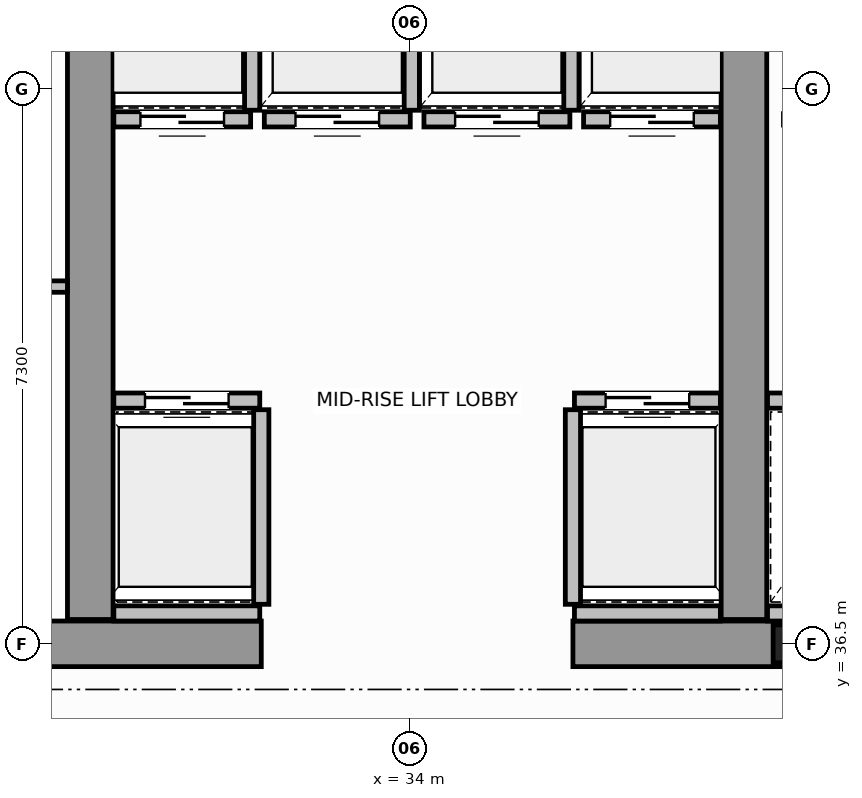
"""IFC4 building model, lengths in metres.
Left out: names, types, materials, properties, quantities, classifications, styles, units other than length and angle.
Written with IfcOpenShell. Run it as: python <this file> out.ifc"""

import sys

from ifc_helpers import new_model, si_unit, direction, frame, frame_2d, origin, origin_2d, place, context, subcontext, project, spatial, rectangle, i_section, extrude, source, transform, mapped, element, fill, save


model = new_model("IFC4")
c1 = context("Model", 3, precision=1e-05, world=origin(), true_north=direction((0.0, 1.0)))
c2 = subcontext(c1, "Body", "Model", "MODEL_VIEW")
j1 = project(units=[si_unit("LENGTHUNIT", "METRE"), si_unit("PLANEANGLEUNIT", "RADIAN")], contexts=[c1])
p1 = place(None, origin())
s1 = spatial("IfcSite", under=j1, at=p1, CompositionType="ELEMENT")
p2 = place(p1, origin())
s2 = spatial("IfcBuilding", under=s1, at=p2, CompositionType="ELEMENT")
p3 = place(p2, frame((0.0, 0.0, 191.8)))
s3 = spatial("IfcBuildingStorey", under=s2, at=p3, CompositionType="ELEMENT", Elevation=191.8)
m1 = source(origin(), c2, "Body", "SweptSolid", [
    extrude(i_section(OverallWidth=0.432, OverallDepth=0.498, WebThickness=0.055, FlangeThickness=0.068, FilletRadius=0.015, at=origin_2d()), origin(), (0.0, 0.0, 1.0), 3.8),
])
p4 = place(p3, frame((39.0, 36.5, 0.0), z_axis=(0.0, 0.0, 1.0), x_axis=(1.0, 0.0, 0.0)))
e1 = element("IfcColumn", 1, at=p4, inside=s3, PredefinedType="COLUMN", context=c2, shape_type="MappedRepresentation", body=[
    mapped(m1, transform((0.0, 0.0, 0.0), scale=1.0)),
])
for number, where, z_axis, x_axis in (
    (2, (27.55, 36.5, 0.0), (0.0, 0.0, 1.0), (1.0, 0.0, 0.0)),
    (3, (36.15, 36.5, 0.0), (0.0, 0.0, 1.0), (1.0, 0.0, 0.0)),
):
    element("IfcWall", number, at=place(p3, frame(where, z_axis=z_axis, x_axis=x_axis)), inside=s3, PredefinedType="SHEAR", context=c2, shape_type="SweptSolid", body=[
        extrude(rectangle(XDim=4.5, YDim=0.6, at=frame_2d((2.25, 0.0))), origin(), (0.0, 0.0, 1.0), 3.8),
    ])
for number, where, z_axis, x_axis in (
    (4, (29.8, 36.82, 0.0), (0.0, 0.0, 1.0), (0.0, 1.0, 0.0)),
    (5, (38.4, 36.82, 0.0), (0.0, 0.0, 1.0), (0.0, 1.0, 0.0)),
):
    element("IfcWall", number, at=place(p3, frame(where, z_axis=z_axis, x_axis=x_axis)), inside=s3, PredefinedType="SHEAR", context=c2, shape_type="SweptSolid", body=[
        extrude(rectangle(XDim=9.38, YDim=0.6, at=frame_2d((4.69, 0.0))), origin(), (0.0, 0.0, 1.0), 3.8),
    ])
p5 = place(p3, frame((30.11, 39.7, 0.0), z_axis=(0.0, 0.0, 1.0), x_axis=(1.0, 0.0, 0.0)))
e6 = element("IfcWall", 6, at=p5, inside=s3, PredefinedType="SOLIDWALL", context=c2, shape_type="SweptSolid", body=[
    extrude(rectangle(XDim=1.92, YDim=0.2, at=frame_2d((0.96, 0.0))), origin(), (0.0, 0.0, 1.0), 3.58),
])
p6 = place(p5, frame((0.41, 0.0, 0.0)))
e7 = element("IfcOpeningElement", 7, at=p6, cuts=e6, PredefinedType="OPENING", context=c2, shape_type="SweptSolid", body=[
    extrude(rectangle(XDim=1.1, YDim=2.15, at=frame_2d((0.55, 1.075))), frame((0.0, 0.11, 0.0), z_axis=(0.0, -1.0, 0.0), x_axis=(1.0, 0.0, 0.0)), (0.0, 0.0, 1.0), 0.22),
])
p7 = place(p3, frame((30.11, 36.9, 0.0), z_axis=(0.0, 0.0, 1.0), x_axis=(1.0, 0.0, 0.0)))
e8 = element("IfcWall", 8, at=p7, inside=s3, PredefinedType="SOLIDWALL", context=c2, shape_type="SweptSolid", body=[
    extrude(rectangle(XDim=1.92, YDim=0.2, at=frame_2d((0.96, 0.0))), origin(), (0.0, 0.0, 1.0), 3.58),
])
p8 = place(p3, frame((32.05, 37.02, 0.0), z_axis=(0.0, 0.0, 1.0), x_axis=(0.0, 1.0, 0.0)))
e9 = element("IfcWall", 9, at=p8, inside=s3, PredefinedType="SOLIDWALL", context=c2, shape_type="SweptSolid", body=[
    extrude(rectangle(XDim=2.56, YDim=0.2, at=frame_2d((1.28, 0.0))), origin(), (0.0, 0.0, 1.0), 3.58),
])
p9 = place(p3, frame((36.17, 39.7, 0.0), z_axis=(0.0, 0.0, 1.0), x_axis=(1.0, 0.0, 0.0)))
e10 = element("IfcWall", 10, at=p9, inside=s3, PredefinedType="SOLIDWALL", context=c2, shape_type="SweptSolid", body=[
    extrude(rectangle(XDim=1.92, YDim=0.2, at=frame_2d((0.96, 0.0))), origin(), (0.0, 0.0, 1.0), 3.58),
])
p10 = place(p9, frame((0.41, 0.0, 0.0)))
e11 = element("IfcOpeningElement", 11, at=p10, cuts=e10, PredefinedType="OPENING", context=c2, shape_type="SweptSolid", body=[
    extrude(rectangle(XDim=1.1, YDim=2.15, at=frame_2d((0.55, 1.075))), frame((0.0, 0.11, 0.0), z_axis=(0.0, -1.0, 0.0), x_axis=(1.0, 0.0, 0.0)), (0.0, 0.0, 1.0), 0.22),
])
p11 = place(p3, frame((36.17, 36.9, 0.0), z_axis=(0.0, 0.0, 1.0), x_axis=(1.0, 0.0, 0.0)))
e12 = element("IfcWall", 12, at=p11, inside=s3, PredefinedType="SOLIDWALL", context=c2, shape_type="SweptSolid", body=[
    extrude(rectangle(XDim=1.92, YDim=0.2, at=frame_2d((0.96, 0.0))), origin(), (0.0, 0.0, 1.0), 3.58),
])
p12 = place(p3, frame((36.15, 37.02, 0.0), z_axis=(0.0, 0.0, 1.0), x_axis=(0.0, 1.0, 0.0)))
e13 = element("IfcWall", 13, at=p12, inside=s3, PredefinedType="SOLIDWALL", context=c2, shape_type="SweptSolid", body=[
    extrude(rectangle(XDim=2.56, YDim=0.2, at=frame_2d((1.28, 0.0))), origin(), (0.0, 0.0, 1.0), 3.58),
])
p13 = place(p3, frame((30.11, 43.4, 0.0), z_axis=(0.0, 0.0, 1.0), x_axis=(1.0, 0.0, 0.0)))
e14 = element("IfcWall", 14, at=p13, inside=s3, PredefinedType="SOLIDWALL", context=c2, shape_type="SweptSolid", body=[
    extrude(rectangle(XDim=1.8, YDim=0.2, at=frame_2d((0.9, 0.0))), origin(), (0.0, 0.0, 1.0), 3.58),
])
p14 = place(p13, frame((0.35, 0.0, 0.0)))
e15 = element("IfcOpeningElement", 15, at=p14, cuts=e14, PredefinedType="OPENING", context=c2, shape_type="SweptSolid", body=[
    extrude(rectangle(XDim=1.1, YDim=2.15, at=frame_2d((0.55, 1.075))), frame((0.0, 0.11, 0.0), z_axis=(0.0, -1.0, 0.0), x_axis=(1.0, 0.0, 0.0)), (0.0, 0.0, 1.0), 0.22),
])
p15 = place(p3, frame((31.93, 43.52, 0.0), z_axis=(0.0, 0.0, 1.0), x_axis=(0.0, 1.0, 0.0)))
e16 = element("IfcWall", 16, at=p15, inside=s3, PredefinedType="SOLIDWALL", context=c2, shape_type="SweptSolid", body=[
    extrude(rectangle(XDim=2.56, YDim=0.2, at=frame_2d((1.28, 0.0))), origin(), (0.0, 0.0, 1.0), 3.58),
])
p16 = place(p3, frame((32.09, 43.4, 0.0), z_axis=(0.0, 0.0, 1.0), x_axis=(1.0, 0.0, 0.0)))
e17 = element("IfcWall", 17, at=p16, inside=s3, PredefinedType="SOLIDWALL", context=c2, shape_type="SweptSolid", body=[
    extrude(rectangle(XDim=1.92, YDim=0.2, at=frame_2d((0.96, 0.0))), origin(), (0.0, 0.0, 1.0), 3.58),
])
p17 = place(p16, frame((0.41, 0.0, 0.0)))
e18 = element("IfcOpeningElement", 18, at=p17, cuts=e17, PredefinedType="OPENING", context=c2, shape_type="SweptSolid", body=[
    extrude(rectangle(XDim=1.1, YDim=2.15, at=frame_2d((0.55, 1.075))), frame((0.0, 0.11, 0.0), z_axis=(0.0, -1.0, 0.0), x_axis=(1.0, 0.0, 0.0)), (0.0, 0.0, 1.0), 0.22),
])
p18 = place(p3, frame((34.03, 43.52, 0.0), z_axis=(0.0, 0.0, 1.0), x_axis=(0.0, 1.0, 0.0)))
e19 = element("IfcWall", 19, at=p18, inside=s3, PredefinedType="SOLIDWALL", context=c2, shape_type="SweptSolid", body=[
    extrude(rectangle(XDim=2.56, YDim=0.2, at=frame_2d((1.28, 0.0))), origin(), (0.0, 0.0, 1.0), 3.58),
])
p19 = place(p3, frame((34.19, 43.4, 0.0), z_axis=(0.0, 0.0, 1.0), x_axis=(1.0, 0.0, 0.0)))
e20 = element("IfcWall", 20, at=p19, inside=s3, PredefinedType="SOLIDWALL", context=c2, shape_type="SweptSolid", body=[
    extrude(rectangle(XDim=1.92, YDim=0.2, at=frame_2d((0.96, 0.0))), origin(), (0.0, 0.0, 1.0), 3.58),
])
p20 = place(p19, frame((0.41, 0.0, 0.0)))
e21 = element("IfcOpeningElement", 21, at=p20, cuts=e20, PredefinedType="OPENING", context=c2, shape_type="SweptSolid", body=[
    extrude(rectangle(XDim=1.1, YDim=2.15, at=frame_2d((0.55, 1.075))), frame((0.0, 0.11, 0.0), z_axis=(0.0, -1.0, 0.0), x_axis=(1.0, 0.0, 0.0)), (0.0, 0.0, 1.0), 0.22),
])
p21 = place(p3, frame((36.13, 43.52, 0.0), z_axis=(0.0, 0.0, 1.0), x_axis=(0.0, 1.0, 0.0)))
e22 = element("IfcWall", 22, at=p21, inside=s3, PredefinedType="SOLIDWALL", context=c2, shape_type="SweptSolid", body=[
    extrude(rectangle(XDim=2.56, YDim=0.2, at=frame_2d((1.28, 0.0))), origin(), (0.0, 0.0, 1.0), 3.58),
])
p22 = place(p3, frame((36.29, 43.4, 0.0), z_axis=(0.0, 0.0, 1.0), x_axis=(1.0, 0.0, 0.0)))
e23 = element("IfcWall", 23, at=p22, inside=s3, PredefinedType="SOLIDWALL", context=c2, shape_type="SweptSolid", body=[
    extrude(rectangle(XDim=1.8, YDim=0.2, at=frame_2d((0.9, 0.0))), origin(), (0.0, 0.0, 1.0), 3.58),
])
p23 = place(p22, frame((0.35, 0.0, 0.0)))
e24 = element("IfcOpeningElement", 24, at=p23, cuts=e23, PredefinedType="OPENING", context=c2, shape_type="SweptSolid", body=[
    extrude(rectangle(XDim=1.1, YDim=2.15, at=frame_2d((0.55, 1.075))), frame((0.0, 0.11, 0.0), z_axis=(0.0, -1.0, 0.0), x_axis=(1.0, 0.0, 0.0)), (0.0, 0.0, 1.0), 0.22),
])
for number, where, z_axis, x_axis in (
    (25, (38.71, 39.7, 0.0), (0.0, 0.0, 1.0), (1.0, 0.0, 0.0)),
    (26, (38.71, 36.9, 0.0), (0.0, 0.0, 1.0), (1.0, 0.0, 0.0)),
):
    element("IfcWall", number, at=place(p3, frame(where, z_axis=z_axis, x_axis=x_axis)), inside=s3, PredefinedType="SOLIDWALL", context=c2, shape_type="SweptSolid", body=[
        extrude(rectangle(XDim=1.92, YDim=0.2, at=frame_2d((0.96, 0.0))), origin(), (0.0, 0.0, 1.0), 3.58),
    ])
p24 = place(p3, frame((21.5, 41.2, 0.0), z_axis=(0.0, 0.0, 1.0), x_axis=(1.0, 0.0, 0.0)))
e27 = element("IfcWall", 27, at=p24, inside=s3, PredefinedType="PARTITIONING", context=c2, shape_type="SweptSolid", body=[
    extrude(rectangle(XDim=8.0, YDim=0.15, at=frame_2d((4.0, 0.0))), origin(), (0.0, 0.0, 1.0), 3.58),
])
p25 = place(p24, frame((3.4, 0.0, 0.0)))
e28 = element("IfcOpeningElement", 28, at=p25, cuts=e27, PredefinedType="OPENING", context=c2, shape_type="SweptSolid", body=[
    extrude(rectangle(XDim=0.9, YDim=2.1, at=frame_2d((0.45, 1.05))), frame((0.0, 0.085, 0.0), z_axis=(0.0, -1.0, 0.0), x_axis=(1.0, 0.0, 0.0)), (0.0, 0.0, 1.0), 0.17),
])
m2 = source(origin(), c2, "Body", "SweptSolid", [
    extrude(rectangle(XDim=1.1, YDim=2.15, at=frame_2d((0.55, 1.075))), frame((0.0, 0.025, 0.0), z_axis=(0.0, -1.0, 0.0), x_axis=(1.0, 0.0, 0.0)), (0.0, 0.0, 1.0), 0.05),
])
p26 = place(p6, origin())
e29 = element("IfcDoor", 29, at=p26, inside=s3, OperationType="DOUBLE_DOOR_SLIDING", PredefinedType="DOOR", context=c2, shape_type="MappedRepresentation", body=[
    mapped(m2, transform((0.0, 0.0, 0.0), scale=1.0)),
])
fill(e7, e29)
p27 = place(p10, origin())
e30 = element("IfcDoor", 30, at=p27, inside=s3, OperationType="DOUBLE_DOOR_SLIDING", PredefinedType="DOOR", context=c2, shape_type="MappedRepresentation", body=[
    mapped(m2, transform((0.0, 0.0, 0.0), scale=1.0)),
])
fill(e11, e30)
p28 = place(p14, origin())
e31 = element("IfcDoor", 31, at=p28, inside=s3, OperationType="DOUBLE_DOOR_SLIDING", PredefinedType="DOOR", context=c2, shape_type="MappedRepresentation", body=[
    mapped(m2, transform((0.0, 0.0, 0.0), scale=1.0)),
])
fill(e15, e31)
p29 = place(p17, origin())
e32 = element("IfcDoor", 32, at=p29, inside=s3, OperationType="DOUBLE_DOOR_SLIDING", PredefinedType="DOOR", context=c2, shape_type="MappedRepresentation", body=[
    mapped(m2, transform((0.0, 0.0, 0.0), scale=1.0)),
])
fill(e18, e32)
p30 = place(p20, origin())
e33 = element("IfcDoor", 33, at=p30, inside=s3, OperationType="DOUBLE_DOOR_SLIDING", PredefinedType="DOOR", context=c2, shape_type="MappedRepresentation", body=[
    mapped(m2, transform((0.0, 0.0, 0.0), scale=1.0)),
])
fill(e21, e33)
p31 = place(p23, origin())
e34 = element("IfcDoor", 34, at=p31, inside=s3, OperationType="DOUBLE_DOOR_SLIDING", PredefinedType="DOOR", context=c2, shape_type="MappedRepresentation", body=[
    mapped(m2, transform((0.0, 0.0, 0.0), scale=1.0)),
])
fill(e24, e34)
save(model, sys.argv[1])
